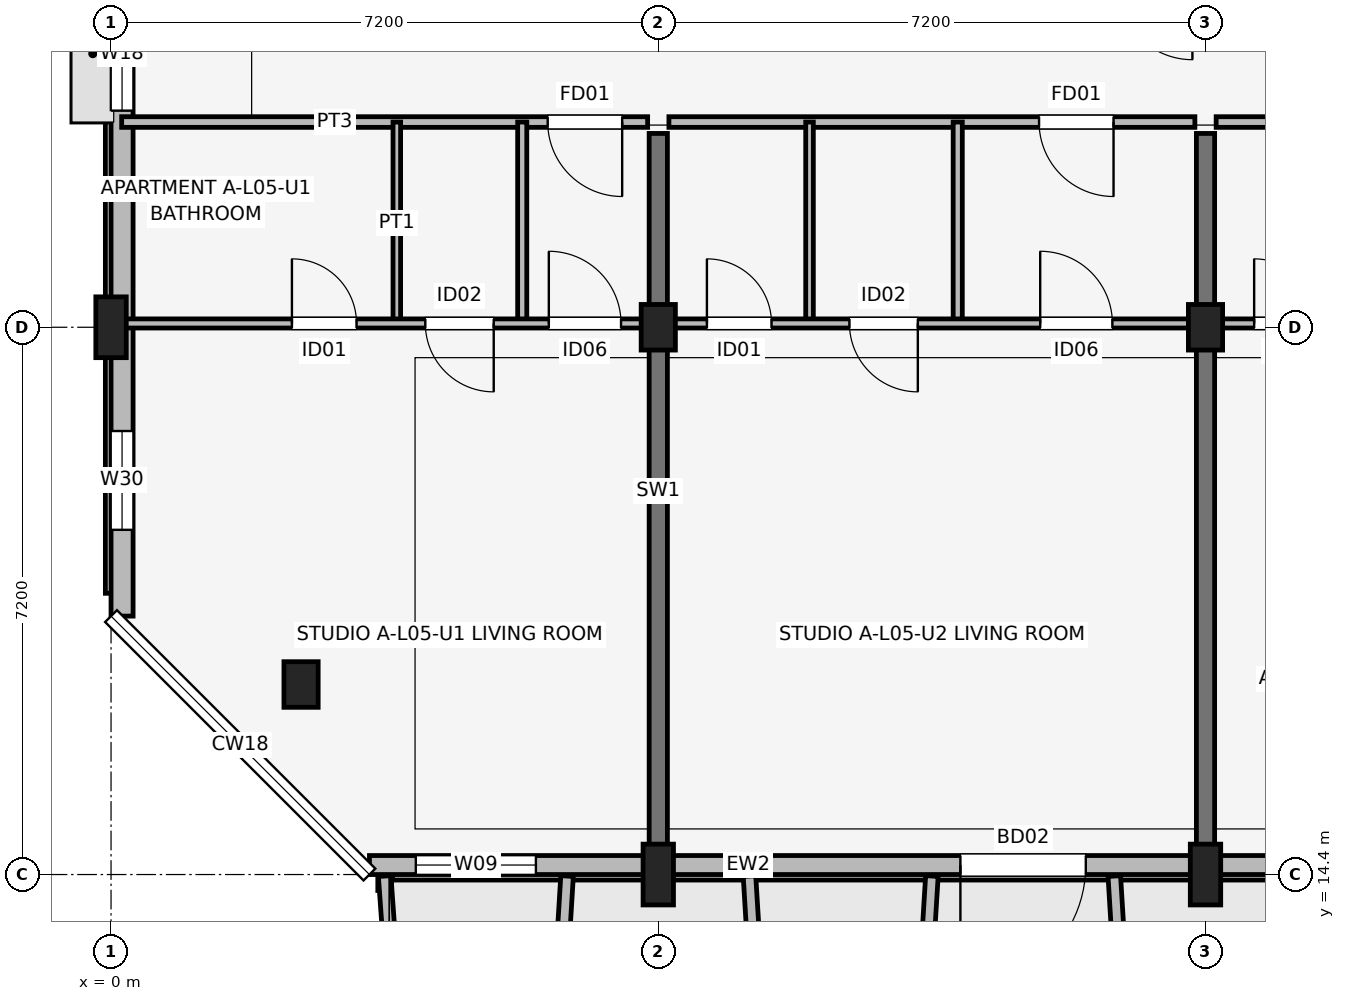
"""IFC4 building model, lengths in metres.
Left out: names, types, materials, properties, quantities, classifications, styles, units other than length and angle.
Written with IfcOpenShell. Run it as: python <this file> out.ifc"""

import sys

from ifc_helpers import new_model, si_unit, direction, frame, frame_2d, origin, origin_2d, place, context, subcontext, project, spatial, rectangle, extrude, element, fill, save


model = new_model("IFC4")
c1 = context("Model", 3, precision=1e-05, world=origin(), true_north=direction((0.0, 1.0)))
c2 = subcontext(c1, "Body", "Model", "MODEL_VIEW")
j1 = project(units=[si_unit("LENGTHUNIT", "METRE"), si_unit("PLANEANGLEUNIT", "RADIAN")], contexts=[c1])
p1 = place(None, origin())
s1 = spatial("IfcSite", under=j1, at=p1, CompositionType="ELEMENT")
p2 = place(p1, origin())
s2 = spatial("IfcBuilding", under=s1, at=p2, CompositionType="ELEMENT")
p3 = place(p2, frame((0.0, 0.0, 18.15)))
s3 = spatial("IfcBuildingStorey", under=s2, at=p3, CompositionType="ELEMENT", Elevation=18.15)
p4 = place(p3, frame((2.5, 16.9, 0.0), z_axis=(0.0, 0.0, 1.0), x_axis=(1.0, 0.0, 0.0)))
e1 = element("IfcColumn", 1, at=p4, inside=s3, PredefinedType="COLUMN", context=c2, shape_type="SweptSolid", body=[
    extrude(rectangle(XDim=0.45, YDim=0.6, at=origin_2d()), origin(), (0.0, 0.0, 1.0), 3.15),
])
for number, where, z_axis, x_axis in (
    (2, (0.0, 21.6, 0.0), (0.0, 0.0, 1.0), (1.0, 0.0, 0.0)),
    (3, (7.2, 14.4, 0.0), (0.0, 0.0, 1.0), (1.0, 0.0, 0.0)),
):
    element("IfcColumn", number, at=place(p3, frame(where, z_axis=z_axis, x_axis=x_axis)), inside=s3, PredefinedType="COLUMN", context=c2, shape_type="SweptSolid", body=[
        extrude(rectangle(XDim=0.4, YDim=0.8, at=origin_2d()), origin(), (0.0, 0.0, 1.0), 3.15),
    ])
p5 = place(p3, frame((7.2, 21.6, 0.0), z_axis=(0.0, 0.0, 1.0), x_axis=(1.0, 0.0, 0.0)))
e4 = element("IfcColumn", 4, at=p5, inside=s3, PredefinedType="COLUMN", context=c2, shape_type="SweptSolid", body=[
    extrude(rectangle(XDim=0.45, YDim=0.6, at=origin_2d()), origin(), (0.0, 0.0, 1.0), 3.15),
])
p6 = place(p3, frame((14.4, 14.4, 0.0), z_axis=(0.0, 0.0, 1.0), x_axis=(1.0, 0.0, 0.0)))
e5 = element("IfcColumn", 5, at=p6, inside=s3, PredefinedType="COLUMN", context=c2, shape_type="SweptSolid", body=[
    extrude(rectangle(XDim=0.4, YDim=0.8, at=origin_2d()), origin(), (0.0, 0.0, 1.0), 3.15),
])
p7 = place(p3, frame((14.4, 21.6, 0.0), z_axis=(0.0, 0.0, 1.0), x_axis=(1.0, 0.0, 0.0)))
e6 = element("IfcColumn", 6, at=p7, inside=s3, PredefinedType="COLUMN", context=c2, shape_type="SweptSolid", body=[
    extrude(rectangle(XDim=0.45, YDim=0.6, at=origin_2d()), origin(), (0.0, 0.0, 1.0), 3.15),
])
for number, where, z_axis, x_axis in (
    (7, (7.2, 14.75, 0.0), (0.0, 0.0, 1.0), (0.0, 1.0, 0.0)),
    (8, (14.4, 14.75, 0.0), (0.0, 0.0, 1.0), (0.0, 1.0, 0.0)),
):
    element("IfcWall", number, at=place(p3, frame(where, z_axis=z_axis, x_axis=x_axis)), inside=s3, PredefinedType="SHEAR", context=c2, shape_type="SweptSolid", body=[
        extrude(rectangle(XDim=9.4, YDim=0.24, at=frame_2d((4.7, 0.0))), origin(), (0.0, 0.0, 1.0), 3.15),
    ])
p8 = place(p3, frame((3.4, 14.525, 0.0), z_axis=(0.0, 0.0, 1.0), x_axis=(1.0, 0.0, 0.0)))
e9 = element("IfcWall", 9, at=p8, inside=s3, PredefinedType="SOLIDWALL", context=c2, shape_type="SweptSolid", body=[
    extrude(rectangle(XDim=29.2, YDim=0.25, at=frame_2d((14.6, 0.0))), origin(), (0.0, 0.0, 1.0), 2.43),
])
p9 = place(p8, frame((9.425, 0.0, 0.0), z_axis=(0.0, 0.0, 1.0), x_axis=(-1.0, 0.0, 0.0)))
e10 = element("IfcOpeningElement", 10, at=p9, cuts=e9, PredefinedType="OPENING", context=c2, shape_type="SweptSolid", body=[
    extrude(rectangle(XDim=1.65, YDim=2.15, at=frame_2d((0.825, 1.075))), frame((0.0, 0.135, 0.0), z_axis=(0.0, -1.0, 0.0), x_axis=(1.0, 0.0, 0.0)), (0.0, 0.0, 1.0), 0.27),
])
p10 = place(p8, frame((23.75, 0.0, 0.0), z_axis=(0.0, 0.0, 1.0), x_axis=(-1.0, 0.0, 0.0)))
e11 = element("IfcOpeningElement", 11, at=p10, cuts=e9, PredefinedType="OPENING", context=c2, shape_type="SweptSolid", body=[
    extrude(rectangle(XDim=1.5, YDim=2.15, at=frame_2d((0.75, 1.075))), frame((0.0, 0.135, 0.0), z_axis=(0.0, -1.0, 0.0), x_axis=(1.0, 0.0, 0.0)), (0.0, 0.0, 1.0), 0.27),
])
p11 = place(p8, frame((0.61, 0.0, 0.7)))
e12 = element("IfcOpeningElement", 12, at=p11, cuts=e9, PredefinedType="OPENING", context=c2, shape_type="SweptSolid", body=[
    extrude(rectangle(XDim=1.58, YDim=1.6, at=frame_2d((0.79, 0.8))), frame((0.0, 0.135, 0.0), z_axis=(0.0, -1.0, 0.0), x_axis=(1.0, 0.0, 0.0)), (0.0, 0.0, 1.0), 0.27),
])
p12 = place(p8, frame((12.54, 0.0, 0.7)))
e13 = element("IfcOpeningElement", 13, at=p12, cuts=e9, PredefinedType="OPENING", context=c2, shape_type="SweptSolid", body=[
    extrude(rectangle(XDim=1.72, YDim=1.6, at=frame_2d((0.86, 0.8))), frame((0.0, 0.135, 0.0), z_axis=(0.0, -1.0, 0.0), x_axis=(1.0, 0.0, 0.0)), (0.0, 0.0, 1.0), 0.27),
])
p13 = place(p8, frame((15.765, 0.0, 0.75)))
e14 = element("IfcOpeningElement", 14, at=p13, cuts=e9, PredefinedType="OPENING", context=c2, shape_type="SweptSolid", body=[
    extrude(rectangle(XDim=0.72, YDim=1.35, at=frame_2d((0.36, 0.675))), frame((0.0, 0.135, 0.0), z_axis=(0.0, -1.0, 0.0), x_axis=(1.0, 0.0, 0.0)), (0.0, 0.0, 1.0), 0.27),
])
p14 = place(p8, frame((18.56, 0.0, 0.75)))
e15 = element("IfcOpeningElement", 15, at=p14, cuts=e9, PredefinedType="OPENING", context=c2, shape_type="SweptSolid", body=[
    extrude(rectangle(XDim=0.72, YDim=1.35, at=frame_2d((0.36, 0.675))), frame((0.0, 0.135, 0.0), z_axis=(0.0, -1.0, 0.0), x_axis=(1.0, 0.0, 0.0)), (0.0, 0.0, 1.0), 0.27),
])
p15 = place(p8, frame((25.76, 0.0, 0.75)))
e16 = element("IfcOpeningElement", 16, at=p15, cuts=e9, PredefinedType="OPENING", context=c2, shape_type="SweptSolid", body=[
    extrude(rectangle(XDim=0.72, YDim=1.35, at=frame_2d((0.36, 0.675))), frame((0.0, 0.135, 0.0), z_axis=(0.0, -1.0, 0.0), x_axis=(1.0, 0.0, 0.0)), (0.0, 0.0, 1.0), 0.27),
])
p16 = place(p8, frame((27.65, 0.0, 0.75)))
e17 = element("IfcOpeningElement", 17, at=p16, cuts=e9, PredefinedType="OPENING", context=c2, shape_type="SweptSolid", body=[
    extrude(rectangle(XDim=1.1, YDim=1.5, at=frame_2d((0.55, 0.75))), frame((0.0, 0.135, 0.0), z_axis=(0.0, -1.0, 0.0), x_axis=(1.0, 0.0, 0.0)), (0.0, 0.0, 1.0), 0.27),
])
p17 = place(p3, frame((0.145, 32.6, 0.0), z_axis=(0.0, 0.0, 1.0), x_axis=(0.0, -1.0, 0.0)))
e18 = element("IfcWall", 18, at=p17, inside=s3, PredefinedType="SOLIDWALL", context=c2, shape_type="SweptSolid", body=[
    extrude(rectangle(XDim=14.8, YDim=0.29, at=frame_2d((7.4, 0.0))), origin(), (0.0, 0.0, 1.0), 2.38),
])
p18 = place(p17, frame((6.65, 0.0, 1.05)))
e19 = element("IfcOpeningElement", 19, at=p18, cuts=e18, PredefinedType="OPENING", context=c2, shape_type="SweptSolid", body=[
    extrude(rectangle(XDim=1.5, YDim=1.15, at=frame_2d((0.75, 0.575))), frame((0.0, 0.155, 0.0), z_axis=(0.0, -1.0, 0.0), x_axis=(1.0, 0.0, 0.0)), (0.0, 0.0, 1.0), 0.31),
])
p19 = place(p17, frame((12.365, 0.0, 0.72)))
e20 = element("IfcOpeningElement", 20, at=p19, cuts=e18, PredefinedType="OPENING", context=c2, shape_type="SweptSolid", body=[
    extrude(rectangle(XDim=1.3, YDim=1.55, at=frame_2d((0.65, 0.775))), frame((0.0, 0.155, 0.0), z_axis=(0.0, -1.0, 0.0), x_axis=(1.0, 0.0, 0.0)), (0.0, 0.0, 1.0), 0.31),
])
p20 = place(p3, frame((3.6, 14.38, 0.0), z_axis=(0.0, 0.0, 1.0), x_axis=(0.071194071069, -0.997462482625, 0.0)))
e21 = element("IfcWall", 21, at=p20, inside=s3, PredefinedType="ELEMENTEDWALL", context=c2, shape_type="SweptSolid", body=[
    extrude(rectangle(XDim=1.965, YDim=0.165, at=frame_2d((0.982, 0.0))), origin(), (0.0, 0.0, 1.0), 2.95),
])
p21 = place(p3, frame((6.0, 14.38, 0.0), z_axis=(0.0, 0.0, 1.0), x_axis=(-0.061170732449, -0.998127317276, 0.0)))
e22 = element("IfcWall", 22, at=p21, inside=s3, PredefinedType="ELEMENTEDWALL", context=c2, shape_type="SweptSolid", body=[
    extrude(rectangle(XDim=1.964, YDim=0.165, at=frame_2d((0.982, 0.0))), origin(), (0.0, 0.0, 1.0), 2.95),
])
for number, where, z_axis, x_axis in (
    (23, (8.4, 14.38, 0.0), (0.0, 0.0, 1.0), (0.061, -0.998, 0.0)),
    (24, (10.8, 14.38, 0.0), (0.0, 0.0, 1.0), (-0.061, -0.998, 0.0)),
    (25, (13.2, 14.38, 0.0), (0.0, 0.0, 1.0), (0.061, -0.998, 0.0)),
):
    element("IfcWall", number, at=place(p3, frame(where, z_axis=z_axis, x_axis=x_axis)), inside=s3, PredefinedType="ELEMENTEDWALL", context=c2, shape_type="SweptSolid", body=[
        extrude(rectangle(XDim=1.964, YDim=0.165, at=frame_2d((0.982, 0.0))), origin(), (0.0, 0.0, 1.0), 2.53),
    ])
p22 = place(p3, frame((0.14, 24.3, 0.0), z_axis=(0.0, 0.0, 1.0), x_axis=(1.0, 0.0, 0.0)))
e26 = element("IfcWall", 26, at=p22, inside=s3, PredefinedType="PARTITIONING", context=c2, shape_type="SweptSolid", body=[
    extrude(rectangle(XDim=6.92, YDim=0.14, at=frame_2d((3.46, 0.0))), origin(), (0.0, 0.0, 1.0), 2.38),
])
p23 = place(p22, frame((6.585, 0.0, 0.0), z_axis=(0.0, 0.0, 1.0), x_axis=(-1.0, 0.0, 0.0)))
e27 = element("IfcOpeningElement", 27, at=p23, cuts=e26, PredefinedType="OPENING", context=c2, shape_type="SweptSolid", body=[
    extrude(rectangle(XDim=0.98, YDim=2.1, at=frame_2d((0.49, 1.05))), frame((0.0, 0.08, 0.0), z_axis=(0.0, -1.0, 0.0), x_axis=(1.0, 0.0, 0.0)), (0.0, 0.0, 1.0), 0.16),
])
p24 = place(p3, frame((3.76, 21.65, 0.0), z_axis=(0.0, 0.0, 1.0), x_axis=(0.0, 1.0, 0.0)))
e28 = element("IfcWall", 28, at=p24, inside=s3, PredefinedType="PARTITIONING", context=c2, shape_type="SweptSolid", body=[
    extrude(rectangle(XDim=2.65, YDim=0.1, at=frame_2d((1.325, 0.0))), origin(), (0.0, 0.0, 1.0), 2.375),
])
p25 = place(p3, frame((5.41, 21.65, 0.0), z_axis=(0.0, 0.0, 1.0), x_axis=(0.0, 1.0, 0.0)))
e29 = element("IfcWall", 29, at=p25, inside=s3, PredefinedType="PARTITIONING", context=c2, shape_type="SweptSolid", body=[
    extrude(rectangle(XDim=2.65, YDim=0.12, at=frame_2d((1.325, 0.0))), origin(), (0.0, 0.0, 1.0), 2.375),
])
p26 = place(p3, frame((0.14, 21.65, 0.0), z_axis=(0.0, 0.0, 1.0), x_axis=(1.0, 0.0, 0.0)))
e30 = element("IfcWall", 30, at=p26, inside=s3, PredefinedType="PARTITIONING", context=c2, shape_type="SweptSolid", body=[
    extrude(rectangle(XDim=6.92, YDim=0.12, at=frame_2d((3.46, 0.0))), origin(), (0.0, 0.0, 1.0), 2.375),
])
p27 = place(p26, frame((2.24, 0.0, 0.0)))
e31 = element("IfcOpeningElement", 31, at=p27, cuts=e30, PredefinedType="OPENING", context=c2, shape_type="SweptSolid", body=[
    extrude(rectangle(XDim=0.85, YDim=2.08, at=frame_2d((0.425, 1.04))), frame((0.0, 0.07, 0.0), z_axis=(0.0, -1.0, 0.0), x_axis=(1.0, 0.0, 0.0)), (0.0, 0.0, 1.0), 0.14),
])
p28 = place(p26, frame((4.895, 0.0, 0.0), z_axis=(0.0, 0.0, 1.0), x_axis=(-1.0, 0.0, 0.0)))
e32 = element("IfcOpeningElement", 32, at=p28, cuts=e30, PredefinedType="OPENING", context=c2, shape_type="SweptSolid", body=[
    extrude(rectangle(XDim=0.9, YDim=2.08, at=frame_2d((0.45, 1.04))), frame((0.0, 0.07, 0.0), z_axis=(0.0, -1.0, 0.0), x_axis=(1.0, 0.0, 0.0)), (0.0, 0.0, 1.0), 0.14),
])
p29 = place(p26, frame((5.62, 0.0, 0.0)))
e33 = element("IfcOpeningElement", 33, at=p29, cuts=e30, PredefinedType="OPENING", context=c2, shape_type="SweptSolid", body=[
    extrude(rectangle(XDim=0.95, YDim=2.08, at=frame_2d((0.475, 1.04))), frame((0.0, 0.07, 0.0), z_axis=(0.0, -1.0, 0.0), x_axis=(1.0, 0.0, 0.0)), (0.0, 0.0, 1.0), 0.14),
])
p30 = place(p3, frame((7.34, 24.3, 0.0), z_axis=(0.0, 0.0, 1.0), x_axis=(1.0, 0.0, 0.0)))
e34 = element("IfcWall", 34, at=p30, inside=s3, PredefinedType="PARTITIONING", context=c2, shape_type="SweptSolid", body=[
    extrude(rectangle(XDim=6.92, YDim=0.14, at=frame_2d((3.46, 0.0))), origin(), (0.0, 0.0, 1.0), 2.38),
])
p31 = place(p30, frame((5.85, 0.0, 0.0), z_axis=(0.0, 0.0, 1.0), x_axis=(-1.0, 0.0, 0.0)))
e35 = element("IfcOpeningElement", 35, at=p31, cuts=e34, PredefinedType="OPENING", context=c2, shape_type="SweptSolid", body=[
    extrude(rectangle(XDim=0.98, YDim=2.1, at=frame_2d((0.49, 1.05))), frame((0.0, 0.08, 0.0), z_axis=(0.0, -1.0, 0.0), x_axis=(1.0, 0.0, 0.0)), (0.0, 0.0, 1.0), 0.16),
])
p32 = place(p3, frame((9.19, 21.65, 0.0), z_axis=(0.0, 0.0, 1.0), x_axis=(0.0, 1.0, 0.0)))
e36 = element("IfcWall", 36, at=p32, inside=s3, PredefinedType="PARTITIONING", context=c2, shape_type="SweptSolid", body=[
    extrude(rectangle(XDim=2.65, YDim=0.1, at=frame_2d((1.325, 0.0))), origin(), (0.0, 0.0, 1.0), 2.375),
])
p33 = place(p3, frame((11.14, 21.65, 0.0), z_axis=(0.0, 0.0, 1.0), x_axis=(0.0, 1.0, 0.0)))
e37 = element("IfcWall", 37, at=p33, inside=s3, PredefinedType="PARTITIONING", context=c2, shape_type="SweptSolid", body=[
    extrude(rectangle(XDim=2.65, YDim=0.12, at=frame_2d((1.325, 0.0))), origin(), (0.0, 0.0, 1.0), 2.375),
])
p34 = place(p3, frame((7.34, 21.65, 0.0), z_axis=(0.0, 0.0, 1.0), x_axis=(1.0, 0.0, 0.0)))
e38 = element("IfcWall", 38, at=p34, inside=s3, PredefinedType="PARTITIONING", context=c2, shape_type="SweptSolid", body=[
    extrude(rectangle(XDim=6.92, YDim=0.12, at=frame_2d((3.46, 0.0))), origin(), (0.0, 0.0, 1.0), 2.375),
])
p35 = place(p34, frame((0.5, 0.0, 0.0)))
e39 = element("IfcOpeningElement", 39, at=p35, cuts=e38, PredefinedType="OPENING", context=c2, shape_type="SweptSolid", body=[
    extrude(rectangle(XDim=0.85, YDim=2.08, at=frame_2d((0.425, 1.04))), frame((0.0, 0.07, 0.0), z_axis=(0.0, -1.0, 0.0), x_axis=(1.0, 0.0, 0.0)), (0.0, 0.0, 1.0), 0.14),
])
p36 = place(p34, frame((3.275, 0.0, 0.0), z_axis=(0.0, 0.0, 1.0), x_axis=(-1.0, 0.0, 0.0)))
e40 = element("IfcOpeningElement", 40, at=p36, cuts=e38, PredefinedType="OPENING", context=c2, shape_type="SweptSolid", body=[
    extrude(rectangle(XDim=0.9, YDim=2.08, at=frame_2d((0.45, 1.04))), frame((0.0, 0.07, 0.0), z_axis=(0.0, -1.0, 0.0), x_axis=(1.0, 0.0, 0.0)), (0.0, 0.0, 1.0), 0.14),
])
p37 = place(p34, frame((4.885, 0.0, 0.0)))
e41 = element("IfcOpeningElement", 41, at=p37, cuts=e38, PredefinedType="OPENING", context=c2, shape_type="SweptSolid", body=[
    extrude(rectangle(XDim=0.95, YDim=2.08, at=frame_2d((0.475, 1.04))), frame((0.0, 0.07, 0.0), z_axis=(0.0, -1.0, 0.0), x_axis=(1.0, 0.0, 0.0)), (0.0, 0.0, 1.0), 0.14),
])
p38 = place(p3, frame((14.54, 24.3, 0.0), z_axis=(0.0, 0.0, 1.0), x_axis=(1.0, 0.0, 0.0)))
e42 = element("IfcWall", 42, at=p38, inside=s3, PredefinedType="PARTITIONING", context=c2, shape_type="SweptSolid", body=[
    extrude(rectangle(XDim=6.92, YDim=0.14, at=frame_2d((3.46, 0.0))), origin(), (0.0, 0.0, 1.0), 2.38),
])
p39 = place(p38, frame((6.0, 0.0, 0.0), z_axis=(0.0, 0.0, 1.0), x_axis=(-1.0, 0.0, 0.0)))
e43 = element("IfcOpeningElement", 43, at=p39, cuts=e42, PredefinedType="OPENING", context=c2, shape_type="SweptSolid", body=[
    extrude(rectangle(XDim=0.98, YDim=2.1, at=frame_2d((0.49, 1.05))), frame((0.0, 0.08, 0.0), z_axis=(0.0, -1.0, 0.0), x_axis=(1.0, 0.0, 0.0)), (0.0, 0.0, 1.0), 0.16),
])
p40 = place(p3, frame((14.54, 21.65, 0.0), z_axis=(0.0, 0.0, 1.0), x_axis=(1.0, 0.0, 0.0)))
e44 = element("IfcWall", 44, at=p40, inside=s3, PredefinedType="PARTITIONING", context=c2, shape_type="SweptSolid", body=[
    extrude(rectangle(XDim=6.92, YDim=0.12, at=frame_2d((3.46, 0.0))), origin(), (0.0, 0.0, 1.0), 2.375),
])
p41 = place(p40, frame((0.5, 0.0, 0.0)))
e45 = element("IfcOpeningElement", 45, at=p41, cuts=e44, PredefinedType="OPENING", context=c2, shape_type="SweptSolid", body=[
    extrude(rectangle(XDim=0.85, YDim=2.08, at=frame_2d((0.425, 1.04))), frame((0.0, 0.07, 0.0), z_axis=(0.0, -1.0, 0.0), x_axis=(1.0, 0.0, 0.0)), (0.0, 0.0, 1.0), 0.14),
])
p42 = place(p40, frame((3.425, 0.0, 0.0), z_axis=(0.0, 0.0, 1.0), x_axis=(-1.0, 0.0, 0.0)))
e46 = element("IfcOpeningElement", 46, at=p42, cuts=e44, PredefinedType="OPENING", context=c2, shape_type="SweptSolid", body=[
    extrude(rectangle(XDim=0.9, YDim=2.08, at=frame_2d((0.45, 1.04))), frame((0.0, 0.07, 0.0), z_axis=(0.0, -1.0, 0.0), x_axis=(1.0, 0.0, 0.0)), (0.0, 0.0, 1.0), 0.14),
])
p43 = place(p40, frame((5.035, 0.0, 0.0)))
e47 = element("IfcOpeningElement", 47, at=p43, cuts=e44, PredefinedType="OPENING", context=c2, shape_type="SweptSolid", body=[
    extrude(rectangle(XDim=0.95, YDim=2.08, at=frame_2d((0.475, 1.04))), frame((0.0, 0.07, 0.0), z_axis=(0.0, -1.0, 0.0), x_axis=(1.0, 0.0, 0.0)), (0.0, 0.0, 1.0), 0.14),
])
p44 = place(p9, origin())
e48 = element("IfcDoor", 48, at=p44, inside=s3, OperationType="SINGLE_SWING_LEFT", PredefinedType="DOOR", context=c2, shape_type="SweptSolid", body=[
    extrude(rectangle(XDim=1.65, YDim=2.15, at=frame_2d((0.825, 1.075))), frame((0.0, 0.025, 0.0), z_axis=(0.0, -1.0, 0.0), x_axis=(1.0, 0.0, 0.0)), (0.0, 0.0, 1.0), 0.05),
])
fill(e10, e48)
p45 = place(p11, origin())
e49 = element("IfcWindow", 49, at=p45, inside=s3, PartitioningType="SINGLE_PANEL", PredefinedType="WINDOW", context=c2, shape_type="SweptSolid", body=[
    extrude(rectangle(XDim=1.58, YDim=1.6, at=frame_2d((0.79, 0.8))), frame((0.0, 0.03, 0.0), z_axis=(0.0, -1.0, 0.0), x_axis=(1.0, 0.0, 0.0)), (0.0, 0.0, 1.0), 0.06),
])
fill(e12, e49)
p46 = place(p18, origin())
e50 = element("IfcWindow", 50, at=p46, inside=s3, PartitioningType="SINGLE_PANEL", PredefinedType="WINDOW", context=c2, shape_type="SweptSolid", body=[
    extrude(rectangle(XDim=1.5, YDim=1.15, at=frame_2d((0.75, 0.575))), frame((0.0, 0.03, 0.0), z_axis=(0.0, -1.0, 0.0), x_axis=(1.0, 0.0, 0.0)), (0.0, 0.0, 1.0), 0.06),
])
fill(e19, e50)
p47 = place(p19, origin())
e51 = element("IfcWindow", 51, at=p47, inside=s3, PartitioningType="SINGLE_PANEL", PredefinedType="WINDOW", context=c2, shape_type="SweptSolid", body=[
    extrude(rectangle(XDim=1.3, YDim=1.55, at=frame_2d((0.65, 0.775))), frame((0.0, 0.03, 0.0), z_axis=(0.0, -1.0, 0.0), x_axis=(1.0, 0.0, 0.0)), (0.0, 0.0, 1.0), 0.06),
])
fill(e20, e51)
p48 = place(p23, origin())
e52 = element("IfcDoor", 52, at=p48, inside=s3, OperationType="SINGLE_SWING_RIGHT", PredefinedType="DOOR", context=c2, shape_type="SweptSolid", body=[
    extrude(rectangle(XDim=0.98, YDim=2.1, at=frame_2d((0.49, 1.05))), frame((0.0, 0.025, 0.0), z_axis=(0.0, -1.0, 0.0), x_axis=(1.0, 0.0, 0.0)), (0.0, 0.0, 1.0), 0.05),
])
fill(e27, e52)
p49 = place(p27, origin())
e53 = element("IfcDoor", 53, at=p49, inside=s3, OperationType="SINGLE_SWING_LEFT", PredefinedType="DOOR", context=c2, shape_type="SweptSolid", body=[
    extrude(rectangle(XDim=0.85, YDim=2.08, at=frame_2d((0.425, 1.04))), frame((0.0, 0.025, 0.0), z_axis=(0.0, -1.0, 0.0), x_axis=(1.0, 0.0, 0.0)), (0.0, 0.0, 1.0), 0.05),
])
fill(e31, e53)
p50 = place(p28, origin())
e54 = element("IfcDoor", 54, at=p50, inside=s3, OperationType="SINGLE_SWING_RIGHT", PredefinedType="DOOR", context=c2, shape_type="SweptSolid", body=[
    extrude(rectangle(XDim=0.9, YDim=2.08, at=frame_2d((0.45, 1.04))), frame((0.0, 0.025, 0.0), z_axis=(0.0, -1.0, 0.0), x_axis=(1.0, 0.0, 0.0)), (0.0, 0.0, 1.0), 0.05),
])
fill(e32, e54)
p51 = place(p29, origin())
e55 = element("IfcDoor", 55, at=p51, inside=s3, OperationType="SINGLE_SWING_LEFT", PredefinedType="DOOR", context=c2, shape_type="SweptSolid", body=[
    extrude(rectangle(XDim=0.95, YDim=2.08, at=frame_2d((0.475, 1.04))), frame((0.0, 0.025, 0.0), z_axis=(0.0, -1.0, 0.0), x_axis=(1.0, 0.0, 0.0)), (0.0, 0.0, 1.0), 0.05),
])
fill(e33, e55)
p52 = place(p31, origin())
e56 = element("IfcDoor", 56, at=p52, inside=s3, OperationType="SINGLE_SWING_RIGHT", PredefinedType="DOOR", context=c2, shape_type="SweptSolid", body=[
    extrude(rectangle(XDim=0.98, YDim=2.1, at=frame_2d((0.49, 1.05))), frame((0.0, 0.025, 0.0), z_axis=(0.0, -1.0, 0.0), x_axis=(1.0, 0.0, 0.0)), (0.0, 0.0, 1.0), 0.05),
])
fill(e35, e56)
p53 = place(p35, origin())
e57 = element("IfcDoor", 57, at=p53, inside=s3, OperationType="SINGLE_SWING_LEFT", PredefinedType="DOOR", context=c2, shape_type="SweptSolid", body=[
    extrude(rectangle(XDim=0.85, YDim=2.08, at=frame_2d((0.425, 1.04))), frame((0.0, 0.025, 0.0), z_axis=(0.0, -1.0, 0.0), x_axis=(1.0, 0.0, 0.0)), (0.0, 0.0, 1.0), 0.05),
])
fill(e39, e57)
p54 = place(p36, origin())
e58 = element("IfcDoor", 58, at=p54, inside=s3, OperationType="SINGLE_SWING_RIGHT", PredefinedType="DOOR", context=c2, shape_type="SweptSolid", body=[
    extrude(rectangle(XDim=0.9, YDim=2.08, at=frame_2d((0.45, 1.04))), frame((0.0, 0.025, 0.0), z_axis=(0.0, -1.0, 0.0), x_axis=(1.0, 0.0, 0.0)), (0.0, 0.0, 1.0), 0.05),
])
fill(e40, e58)
p55 = place(p37, origin())
e59 = element("IfcDoor", 59, at=p55, inside=s3, OperationType="SINGLE_SWING_LEFT", PredefinedType="DOOR", context=c2, shape_type="SweptSolid", body=[
    extrude(rectangle(XDim=0.95, YDim=2.08, at=frame_2d((0.475, 1.04))), frame((0.0, 0.025, 0.0), z_axis=(0.0, -1.0, 0.0), x_axis=(1.0, 0.0, 0.0)), (0.0, 0.0, 1.0), 0.05),
])
fill(e41, e59)
p56 = place(p41, origin())
e60 = element("IfcDoor", 60, at=p56, inside=s3, OperationType="SINGLE_SWING_LEFT", PredefinedType="DOOR", context=c2, shape_type="SweptSolid", body=[
    extrude(rectangle(XDim=0.85, YDim=2.08, at=frame_2d((0.425, 1.04))), frame((0.0, 0.025, 0.0), z_axis=(0.0, -1.0, 0.0), x_axis=(1.0, 0.0, 0.0)), (0.0, 0.0, 1.0), 0.05),
])
fill(e45, e60)
save(model, sys.argv[1])
